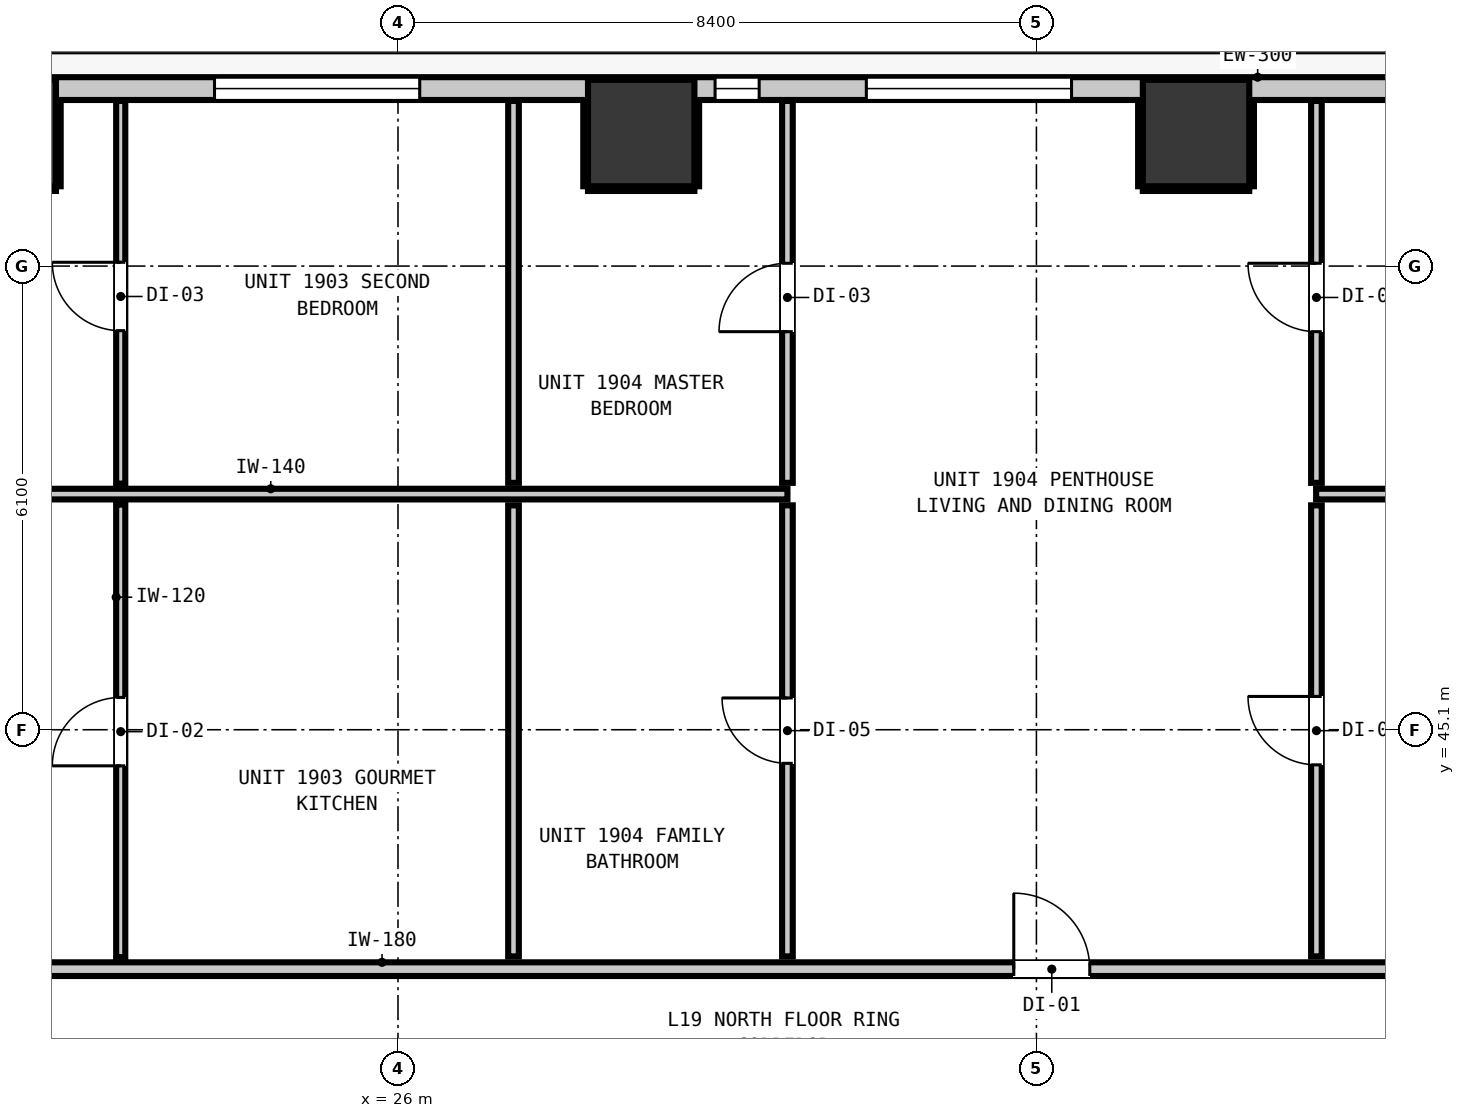
"""IFC4 building model, lengths in metres.
Left out: names, types, materials, properties, quantities, classifications, styles, units other than length and angle.
Written with IfcOpenShell. Run it as: python <this file> out.ifc"""

import sys

from ifc_helpers import new_model, si_unit, direction, frame, frame_2d, origin, origin_2d, place, context, subcontext, project, spatial, rectangle, extrude, element, fill, save


model = new_model("IFC4")
c1 = context("Model", 3, precision=1e-05, world=origin(), true_north=direction((0.0, 1.0)))
c2 = subcontext(c1, "Body", "Model", "MODEL_VIEW")
j1 = project(units=[si_unit("LENGTHUNIT", "METRE"), si_unit("PLANEANGLEUNIT", "RADIAN")], contexts=[c1])
p1 = place(None, origin())
s1 = spatial("IfcSite", under=j1, at=p1, CompositionType="ELEMENT")
p2 = place(p1, origin())
s2 = spatial("IfcBuilding", under=s1, at=p2, CompositionType="ELEMENT")
p3 = place(p2, frame((0.0, 0.0, 68.48)))
s3 = spatial("IfcBuildingStorey", under=s2, at=p3, CompositionType="ELEMENT", Elevation=68.48)
for number, where, z_axis, x_axis in (
    (1, (20.8, 52.95, 0.0), (0.0, 0.0, 1.0), (1.0, 0.0, 0.0)),
    (2, (29.2, 52.95, 0.0), (0.0, 0.0, 1.0), (1.0, 0.0, 0.0)),
    (3, (36.5, 52.95, 0.0), (0.0, 0.0, 1.0), (1.0, 0.0, 0.0)),
):
    element("IfcColumn", number, at=place(p3, frame(where, z_axis=z_axis, x_axis=x_axis)), inside=s3, PredefinedType="COLUMN", context=c2, shape_type="SweptSolid", body=[
        extrude(rectangle(XDim=1.4, YDim=1.4, at=origin_2d()), origin(), (0.0, 0.0, 1.0), 3.32),
    ])
p4 = place(p3, frame((10.365, 53.535, 0.0), z_axis=(0.0, 0.0, 1.0), x_axis=(1.0, 0.0, 0.0)))
e4 = element("IfcWall", 4, at=p4, inside=s3, PredefinedType="STANDARD", context=c2, shape_type="SweptSolid", body=[
    extrude(rectangle(XDim=37.47, YDim=0.3, at=frame_2d((18.735, 0.0))), origin(), (0.0, 0.0, 1.0), 3.06),
])
p5 = place(p4, frame((4.403, 0.0, 0.0)))
e5 = element("IfcOpeningElement", 5, at=p5, cuts=e4, PredefinedType="OPENING", context=c2, shape_type="SweptSolid", body=[
    extrude(rectangle(XDim=1.0, YDim=2.15, at=frame_2d((0.5, 1.075))), frame((0.0, 0.16, 0.0), z_axis=(0.0, -1.0, 0.0), x_axis=(1.0, 0.0, 0.0)), (0.0, 0.0, 1.0), 0.32),
])
p6 = place(p4, frame((6.319, 0.0, 0.85)))
e6 = element("IfcOpeningElement", 6, at=p6, cuts=e4, PredefinedType="OPENING", context=c2, shape_type="SweptSolid", body=[
    extrude(rectangle(XDim=2.7, YDim=2.0, at=frame_2d((1.35, 1.0))), frame((0.0, 0.16, 0.0), z_axis=(0.0, -1.0, 0.0), x_axis=(1.0, 0.0, 0.0)), (0.0, 0.0, 1.0), 0.32),
])
p7 = place(p4, frame((0.324, 0.0, 0.85)))
e7 = element("IfcOpeningElement", 7, at=p7, cuts=e4, PredefinedType="OPENING", context=c2, shape_type="SweptSolid", body=[
    extrude(rectangle(XDim=0.58, YDim=1.5, at=frame_2d((0.29, 0.75))), frame((0.0, 0.16, 0.0), z_axis=(0.0, -1.0, 0.0), x_axis=(1.0, 0.0, 0.0)), (0.0, 0.0, 1.0), 0.32),
])
p8 = place(p4, frame((13.221, 0.0, 0.85)))
e8 = element("IfcOpeningElement", 8, at=p8, cuts=e4, PredefinedType="OPENING", context=c2, shape_type="SweptSolid", body=[
    extrude(rectangle(XDim=2.7, YDim=2.0, at=frame_2d((1.35, 1.0))), frame((0.0, 0.16, 0.0), z_axis=(0.0, -1.0, 0.0), x_axis=(1.0, 0.0, 0.0)), (0.0, 0.0, 1.0), 0.32),
])
p9 = place(p4, frame((21.797, 0.0, 0.85)))
e9 = element("IfcOpeningElement", 9, at=p9, cuts=e4, PredefinedType="OPENING", context=c2, shape_type="SweptSolid", body=[
    extrude(rectangle(XDim=2.7, YDim=2.0, at=frame_2d((1.35, 1.0))), frame((0.0, 0.16, 0.0), z_axis=(0.0, -1.0, 0.0), x_axis=(1.0, 0.0, 0.0)), (0.0, 0.0, 1.0), 0.32),
])
p10 = place(p4, frame((19.807, 0.0, 0.85)))
e10 = element("IfcOpeningElement", 10, at=p10, cuts=e4, PredefinedType="OPENING", context=c2, shape_type="SweptSolid", body=[
    extrude(rectangle(XDim=0.58, YDim=1.5, at=frame_2d((0.29, 0.75))), frame((0.0, 0.16, 0.0), z_axis=(0.0, -1.0, 0.0), x_axis=(1.0, 0.0, 0.0)), (0.0, 0.0, 1.0), 0.32),
])
p11 = place(p4, frame((29.395, 0.0, 0.85)))
e11 = element("IfcOpeningElement", 11, at=p11, cuts=e4, PredefinedType="OPENING", context=c2, shape_type="SweptSolid", body=[
    extrude(rectangle(XDim=2.7, YDim=2.0, at=frame_2d((1.35, 1.0))), frame((0.0, 0.16, 0.0), z_axis=(0.0, -1.0, 0.0), x_axis=(1.0, 0.0, 0.0)), (0.0, 0.0, 1.0), 0.32),
])
p12 = place(p4, frame((34.277, 0.0, 0.85)))
e12 = element("IfcOpeningElement", 12, at=p12, cuts=e4, PredefinedType="OPENING", context=c2, shape_type="SweptSolid", body=[
    extrude(rectangle(XDim=2.7, YDim=2.0, at=frame_2d((1.35, 1.0))), frame((0.0, 0.16, 0.0), z_axis=(0.0, -1.0, 0.0), x_axis=(1.0, 0.0, 0.0)), (0.0, 0.0, 1.0), 0.32),
])
p13 = place(p3, frame((8.027, 41.95, 0.0), z_axis=(0.0, 0.0, 1.0), x_axis=(1.0, 0.0, 0.0)))
e13 = element("IfcWall", 13, at=p13, inside=s3, PredefinedType="PARTITIONING", context=c2, shape_type="SweptSolid", body=[
    extrude(rectangle(XDim=42.146, YDim=0.18, at=frame_2d((21.073, 0.0))), origin(), (0.0, 0.0, 1.0), 3.06),
])
p14 = place(p13, frame((8.451, 0.0, 0.0)))
e14 = element("IfcOpeningElement", 14, at=p14, cuts=e13, PredefinedType="OPENING", context=c2, shape_type="SweptSolid", body=[
    extrude(rectangle(XDim=1.0, YDim=2.15, at=frame_2d((0.5, 1.075))), frame((0.0, 0.1, 0.0), z_axis=(0.0, -1.0, 0.0), x_axis=(1.0, 0.0, 0.0)), (0.0, 0.0, 1.0), 0.2),
])
p15 = place(p13, frame((26.075, 0.0, 0.0)))
e15 = element("IfcOpeningElement", 15, at=p15, cuts=e13, PredefinedType="OPENING", context=c2, shape_type="SweptSolid", body=[
    extrude(rectangle(XDim=1.0, YDim=2.15, at=frame_2d((0.5, 1.075))), frame((0.0, 0.1, 0.0), z_axis=(0.0, -1.0, 0.0), x_axis=(1.0, 0.0, 0.0)), (0.0, 0.0, 1.0), 0.2),
])
p16 = place(p3, frame((8.027, 48.2, 0.0), z_axis=(0.0, 0.0, 1.0), x_axis=(1.0, 0.0, 0.0)))
e16 = element("IfcWall", 16, at=p16, inside=s3, PredefinedType="PARTITIONING", context=c2, shape_type="SweptSolid", body=[
    extrude(rectangle(XDim=23.097, YDim=0.14, at=frame_2d((11.548, 0.0))), origin(), (0.0, 0.0, 1.0), 3.06),
])
p17 = place(p16, frame((8.501, 0.0, 0.0)))
e17 = element("IfcOpeningElement", 17, at=p17, cuts=e16, PredefinedType="OPENING", context=c2, shape_type="SweptSolid", body=[
    extrude(rectangle(XDim=0.9, YDim=2.1, at=frame_2d((0.45, 1.05))), frame((0.0, 0.08, 0.0), z_axis=(0.0, -1.0, 0.0), x_axis=(1.0, 0.0, 0.0)), (0.0, 0.0, 1.0), 0.16),
])
p18 = place(p3, frame((38.08, 48.2, 0.0), z_axis=(0.0, 0.0, 1.0), x_axis=(1.0, 0.0, 0.0)))
e18 = element("IfcWall", 18, at=p18, inside=s3, PredefinedType="PARTITIONING", context=c2, shape_type="SweptSolid", body=[
    extrude(rectangle(XDim=12.093, YDim=0.14, at=frame_2d((6.046, 0.0))), origin(), (0.0, 0.0, 1.0), 3.06),
])
p19 = place(p3, frame((27.52, 42.118, 0.0), z_axis=(0.0, 0.0, 1.0), x_axis=(0.0, 1.0, 0.0)))
e19 = element("IfcWall", 19, at=p19, inside=s3, PredefinedType="PARTITIONING", context=c2, shape_type="SweptSolid", body=[
    extrude(rectangle(XDim=5.934, YDim=0.14, at=frame_2d((2.967, 0.0))), origin(), (0.0, 0.0, 1.0), 3.06),
])
p20 = place(p3, frame((27.52, 48.348, 0.0), z_axis=(0.0, 0.0, 1.0), x_axis=(0.0, 1.0, 0.0)))
e20 = element("IfcWall", 20, at=p20, inside=s3, PredefinedType="PARTITIONING", context=c2, shape_type="SweptSolid", body=[
    extrude(rectangle(XDim=5.025, YDim=0.14, at=frame_2d((2.513, 0.0))), origin(), (0.0, 0.0, 1.0), 3.06),
])
p21 = place(p3, frame((31.124, 42.118, 0.0), z_axis=(0.0, 0.0, 1.0), x_axis=(0.0, 1.0, 0.0)))
e21 = element("IfcWall", 21, at=p21, inside=s3, PredefinedType="PARTITIONING", context=c2, shape_type="SweptSolid", body=[
    extrude(rectangle(XDim=5.934, YDim=0.14, at=frame_2d((2.967, 0.0))), origin(), (0.0, 0.0, 1.0), 3.06),
])
p22 = place(p21, frame((2.54, 0.0, 0.0)))
e22 = element("IfcOpeningElement", 22, at=p22, cuts=e21, PredefinedType="OPENING", context=c2, shape_type="SweptSolid", body=[
    extrude(rectangle(XDim=0.86, YDim=2.02, at=frame_2d((0.43, 1.01))), frame((0.0, 0.08, 0.0), z_axis=(0.0, -1.0, 0.0), x_axis=(1.0, 0.0, 0.0)), (0.0, 0.0, 1.0), 0.16),
])
p23 = place(p3, frame((31.124, 48.348, 0.0), z_axis=(0.0, 0.0, 1.0), x_axis=(0.0, 1.0, 0.0)))
e23 = element("IfcWall", 23, at=p23, inside=s3, PredefinedType="PARTITIONING", context=c2, shape_type="SweptSolid", body=[
    extrude(rectangle(XDim=5.025, YDim=0.14, at=frame_2d((2.513, 0.0))), origin(), (0.0, 0.0, 1.0), 3.06),
])
p24 = place(p23, frame((1.989, 0.0, 0.0)))
e24 = element("IfcOpeningElement", 24, at=p24, cuts=e23, PredefinedType="OPENING", context=c2, shape_type="SweptSolid", body=[
    extrude(rectangle(XDim=0.9, YDim=2.1, at=frame_2d((0.45, 1.05))), frame((0.0, 0.08, 0.0), z_axis=(0.0, -1.0, 0.0), x_axis=(1.0, 0.0, 0.0)), (0.0, 0.0, 1.0), 0.16),
])
p25 = place(p3, frame((38.084, 42.118, 0.0), z_axis=(0.0, 0.0, 1.0), x_axis=(0.0, 1.0, 0.0)))
e25 = element("IfcWall", 25, at=p25, inside=s3, PredefinedType="PARTITIONING", context=c2, shape_type="SweptSolid", body=[
    extrude(rectangle(XDim=5.934, YDim=0.14, at=frame_2d((2.967, 0.0))), origin(), (0.0, 0.0, 1.0), 3.06),
])
p26 = place(p25, frame((2.52, 0.0, 0.0)))
e26 = element("IfcOpeningElement", 26, at=p26, cuts=e25, PredefinedType="OPENING", context=c2, shape_type="SweptSolid", body=[
    extrude(rectangle(XDim=0.9, YDim=2.1, at=frame_2d((0.45, 1.05))), frame((0.0, 0.08, 0.0), z_axis=(0.0, -1.0, 0.0), x_axis=(1.0, 0.0, 0.0)), (0.0, 0.0, 1.0), 0.16),
])
p27 = place(p3, frame((38.084, 48.348, 0.0), z_axis=(0.0, 0.0, 1.0), x_axis=(0.0, 1.0, 0.0)))
e27 = element("IfcWall", 27, at=p27, inside=s3, PredefinedType="PARTITIONING", context=c2, shape_type="SweptSolid", body=[
    extrude(rectangle(XDim=5.025, YDim=0.14, at=frame_2d((2.513, 0.0))), origin(), (0.0, 0.0, 1.0), 3.06),
])
p28 = place(p27, frame((1.989, 0.0, 0.0)))
e28 = element("IfcOpeningElement", 28, at=p28, cuts=e27, PredefinedType="OPENING", context=c2, shape_type="SweptSolid", body=[
    extrude(rectangle(XDim=0.9, YDim=2.1, at=frame_2d((0.45, 1.05))), frame((0.0, 0.08, 0.0), z_axis=(0.0, -1.0, 0.0), x_axis=(1.0, 0.0, 0.0)), (0.0, 0.0, 1.0), 0.16),
])
p29 = place(p3, frame((22.352, 42.108, 0.0), z_axis=(0.0, 0.0, 1.0), x_axis=(0.0, 1.0, 0.0)))
e29 = element("IfcWall", 29, at=p29, inside=s3, PredefinedType="PARTITIONING", context=c2, shape_type="SweptSolid", body=[
    extrude(rectangle(XDim=5.954, YDim=0.12, at=frame_2d((2.977, 0.0))), origin(), (0.0, 0.0, 1.0), 3.06),
])
p30 = place(p29, frame((2.517, 0.0, 0.0)))
e30 = element("IfcOpeningElement", 30, at=p30, cuts=e29, PredefinedType="OPENING", context=c2, shape_type="SweptSolid", body=[
    extrude(rectangle(XDim=0.9, YDim=2.1, at=frame_2d((0.45, 1.05))), frame((0.0, 0.07, 0.0), z_axis=(0.0, -1.0, 0.0), x_axis=(1.0, 0.0, 0.0)), (0.0, 0.0, 1.0), 0.14),
])
p31 = place(p3, frame((22.352, 48.338, 0.0), z_axis=(0.0, 0.0, 1.0), x_axis=(0.0, 1.0, 0.0)))
e31 = element("IfcWall", 31, at=p31, inside=s3, PredefinedType="PARTITIONING", context=c2, shape_type="SweptSolid", body=[
    extrude(rectangle(XDim=5.035, YDim=0.12, at=frame_2d((2.518, 0.0))), origin(), (0.0, 0.0, 1.0), 3.06),
])
p32 = place(p31, frame((2.012, 0.0, 0.0)))
e32 = element("IfcOpeningElement", 32, at=p32, cuts=e31, PredefinedType="OPENING", context=c2, shape_type="SweptSolid", body=[
    extrude(rectangle(XDim=0.9, YDim=2.1, at=frame_2d((0.45, 1.05))), frame((0.0, 0.07, 0.0), z_axis=(0.0, -1.0, 0.0), x_axis=(1.0, 0.0, 0.0)), (0.0, 0.0, 1.0), 0.14),
])
p33 = place(p3, frame((20.1, 52.218, 0.0), z_axis=(0.0, 0.0, 1.0), x_axis=(1.0, 0.0, 0.0)))
e33 = element("IfcWall", 33, at=p33, inside=s3, PredefinedType="PARTITIONING", context=c2, shape_type="SweptSolid", body=[
    extrude(rectangle(XDim=1.4, YDim=0.06, at=frame_2d((0.7, 0.0))), origin(), (0.0, 0.0, 1.0), 1.45),
])
p34 = place(p3, frame((21.532, 52.25, 0.0), z_axis=(0.0, 0.0, 1.0), x_axis=(0.0, 1.0, 0.0)))
e34 = element("IfcWall", 34, at=p34, inside=s3, PredefinedType="PARTITIONING", context=c2, shape_type="SweptSolid", body=[
    extrude(rectangle(XDim=1.12, YDim=0.06, at=frame_2d((0.56, 0.0))), origin(), (0.0, 0.0, 1.0), 1.45),
])
p35 = place(p3, frame((28.5, 52.218, 0.0), z_axis=(0.0, 0.0, 1.0), x_axis=(1.0, 0.0, 0.0)))
e35 = element("IfcWall", 35, at=p35, inside=s3, PredefinedType="PARTITIONING", context=c2, shape_type="SweptSolid", body=[
    extrude(rectangle(XDim=1.4, YDim=0.06, at=frame_2d((0.7, 0.0))), origin(), (0.0, 0.0, 1.0), 1.45),
])
for number, where, z_axis, x_axis in (
    (36, (28.468, 52.25, 0.0), (0.0, 0.0, 1.0), (0.0, 1.0, 0.0)),
    (37, (29.932, 52.25, 0.0), (0.0, 0.0, 1.0), (0.0, 1.0, 0.0)),
):
    element("IfcWall", number, at=place(p3, frame(where, z_axis=z_axis, x_axis=x_axis)), inside=s3, PredefinedType="PARTITIONING", context=c2, shape_type="SweptSolid", body=[
        extrude(rectangle(XDim=1.12, YDim=0.06, at=frame_2d((0.56, 0.0))), origin(), (0.0, 0.0, 1.0), 1.45),
    ])
p36 = place(p3, frame((35.8, 52.218, 0.0), z_axis=(0.0, 0.0, 1.0), x_axis=(1.0, 0.0, 0.0)))
e38 = element("IfcWall", 38, at=p36, inside=s3, PredefinedType="PARTITIONING", context=c2, shape_type="SweptSolid", body=[
    extrude(rectangle(XDim=1.4, YDim=0.06, at=frame_2d((0.7, 0.0))), origin(), (0.0, 0.0, 1.0), 1.45),
])
for number, where, z_axis, x_axis in (
    (39, (35.768, 52.25, 0.0), (0.0, 0.0, 1.0), (0.0, 1.0, 0.0)),
    (40, (37.232, 52.25, 0.0), (0.0, 0.0, 1.0), (0.0, 1.0, 0.0)),
):
    element("IfcWall", number, at=place(p3, frame(where, z_axis=z_axis, x_axis=x_axis)), inside=s3, PredefinedType="PARTITIONING", context=c2, shape_type="SweptSolid", body=[
        extrude(rectangle(XDim=1.12, YDim=0.06, at=frame_2d((0.56, 0.0))), origin(), (0.0, 0.0, 1.0), 1.45),
    ])
p37 = place(p8, origin())
e41 = element("IfcWindow", 41, at=p37, inside=s3, PartitioningType="SINGLE_PANEL", PredefinedType="WINDOW", context=c2, shape_type="SweptSolid", body=[
    extrude(rectangle(XDim=2.7, YDim=2.0, at=frame_2d((1.35, 1.0))), frame((0.0, 0.03, 0.0), z_axis=(0.0, -1.0, 0.0), x_axis=(1.0, 0.0, 0.0)), (0.0, 0.0, 1.0), 0.06),
])
fill(e8, e41)
p38 = place(p9, origin())
e42 = element("IfcWindow", 42, at=p38, inside=s3, PartitioningType="SINGLE_PANEL", PredefinedType="WINDOW", context=c2, shape_type="SweptSolid", body=[
    extrude(rectangle(XDim=2.7, YDim=2.0, at=frame_2d((1.35, 1.0))), frame((0.0, 0.03, 0.0), z_axis=(0.0, -1.0, 0.0), x_axis=(1.0, 0.0, 0.0)), (0.0, 0.0, 1.0), 0.06),
])
fill(e9, e42)
p39 = place(p10, origin())
e43 = element("IfcWindow", 43, at=p39, inside=s3, PartitioningType="SINGLE_PANEL", PredefinedType="WINDOW", context=c2, shape_type="SweptSolid", body=[
    extrude(rectangle(XDim=0.58, YDim=1.5, at=frame_2d((0.29, 0.75))), frame((0.0, 0.03, 0.0), z_axis=(0.0, -1.0, 0.0), x_axis=(1.0, 0.0, 0.0)), (0.0, 0.0, 1.0), 0.06),
])
fill(e10, e43)
p40 = place(p30, origin())
e44 = element("IfcDoor", 44, at=p40, inside=s3, OperationType="SINGLE_SWING_LEFT", PredefinedType="DOOR", context=c2, shape_type="SweptSolid", body=[
    extrude(rectangle(XDim=0.9, YDim=2.1, at=frame_2d((0.45, 1.05))), frame((0.0, 0.025, 0.0), z_axis=(0.0, -1.0, 0.0), x_axis=(1.0, 0.0, 0.0)), (0.0, 0.0, 1.0), 0.05),
])
fill(e30, e44)
p41 = place(p32, origin())
e45 = element("IfcDoor", 45, at=p41, inside=s3, OperationType="SINGLE_SWING_RIGHT", PredefinedType="DOOR", context=c2, shape_type="SweptSolid", body=[
    extrude(rectangle(XDim=0.9, YDim=2.1, at=frame_2d((0.45, 1.05))), frame((0.0, 0.025, 0.0), z_axis=(0.0, -1.0, 0.0), x_axis=(1.0, 0.0, 0.0)), (0.0, 0.0, 1.0), 0.05),
])
fill(e32, e45)
p42 = place(p15, origin())
e46 = element("IfcDoor", 46, at=p42, inside=s3, OperationType="SINGLE_SWING_LEFT", PredefinedType="DOOR", context=c2, shape_type="SweptSolid", body=[
    extrude(rectangle(XDim=1.0, YDim=2.15, at=frame_2d((0.5, 1.075))), frame((0.0, 0.025, 0.0), z_axis=(0.0, -1.0, 0.0), x_axis=(1.0, 0.0, 0.0)), (0.0, 0.0, 1.0), 0.05),
])
fill(e15, e46)
p43 = place(p22, origin())
e47 = element("IfcDoor", 47, at=p43, inside=s3, OperationType="SINGLE_SWING_RIGHT", PredefinedType="DOOR", context=c2, shape_type="SweptSolid", body=[
    extrude(rectangle(XDim=0.86, YDim=2.02, at=frame_2d((0.43, 1.01))), frame((0.0, 0.025, 0.0), z_axis=(0.0, -1.0, 0.0), x_axis=(1.0, 0.0, 0.0)), (0.0, 0.0, 1.0), 0.05),
])
fill(e22, e47)
p44 = place(p24, origin())
e48 = element("IfcDoor", 48, at=p44, inside=s3, OperationType="SINGLE_SWING_LEFT", PredefinedType="DOOR", context=c2, shape_type="SweptSolid", body=[
    extrude(rectangle(XDim=0.9, YDim=2.1, at=frame_2d((0.45, 1.05))), frame((0.0, 0.025, 0.0), z_axis=(0.0, -1.0, 0.0), x_axis=(1.0, 0.0, 0.0)), (0.0, 0.0, 1.0), 0.05),
])
fill(e24, e48)
p45 = place(p26, origin())
e49 = element("IfcDoor", 49, at=p45, inside=s3, OperationType="SINGLE_SWING_RIGHT", PredefinedType="DOOR", context=c2, shape_type="SweptSolid", body=[
    extrude(rectangle(XDim=0.9, YDim=2.1, at=frame_2d((0.45, 1.05))), frame((0.0, 0.025, 0.0), z_axis=(0.0, -1.0, 0.0), x_axis=(1.0, 0.0, 0.0)), (0.0, 0.0, 1.0), 0.05),
])
fill(e26, e49)
p46 = place(p28, origin())
e50 = element("IfcDoor", 50, at=p46, inside=s3, OperationType="SINGLE_SWING_RIGHT", PredefinedType="DOOR", context=c2, shape_type="SweptSolid", body=[
    extrude(rectangle(XDim=0.9, YDim=2.1, at=frame_2d((0.45, 1.05))), frame((0.0, 0.025, 0.0), z_axis=(0.0, -1.0, 0.0), x_axis=(1.0, 0.0, 0.0)), (0.0, 0.0, 1.0), 0.05),
])
fill(e28, e50)
save(model, sys.argv[1])
